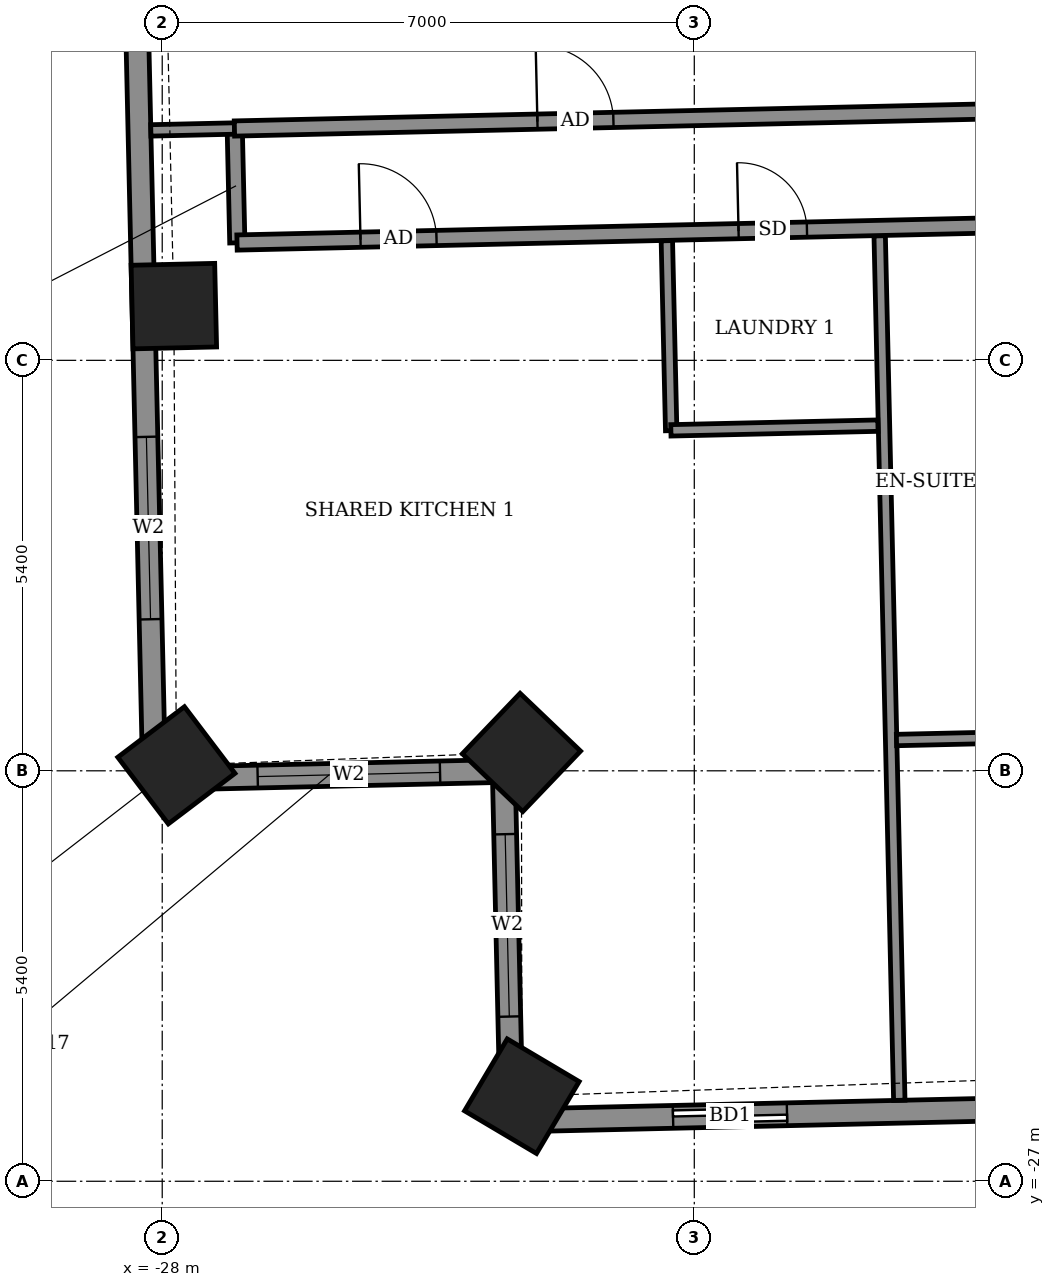
"""IFC4 building model, lengths in metres.
Left out: names, types, materials, properties, quantities, classifications, styles, units other than length and angle.
Written with IfcOpenShell. Run it as: python <this file> out.ifc"""

import sys

from ifc_helpers import new_model, si_unit, direction, frame, frame_2d, origin, origin_2d, place, context, subcontext, project, spatial, rectangle, extrude, element, fill, save


model = new_model("IFC4")
c1 = context("Model", 3, precision=1e-05, world=origin(), true_north=direction((0.0, 1.0)))
c2 = subcontext(c1, "Body", "Model", "MODEL_VIEW")
j1 = project(units=[si_unit("LENGTHUNIT", "METRE"), si_unit("PLANEANGLEUNIT", "RADIAN")], contexts=[c1])
p1 = place(None, origin())
s1 = spatial("IfcSite", under=j1, at=p1, CompositionType="ELEMENT")
p2 = place(p1, origin())
s2 = spatial("IfcBuilding", under=s1, at=p2, CompositionType="ELEMENT")
p3 = place(p2, frame((0.0, 0.0, 231.1)))
s3 = spatial("IfcBuildingStorey", under=s2, at=p3, CompositionType="ELEMENT", Elevation=231.1)
for number, where, z_axis, x_axis in (
    (1, (-27.847, -15.487, -0.55), (0.0, 0.0, 1.0), (0.023, -1.0, 0.0)),
    (2, (-27.814, -21.528, -0.55), (0.0, 0.0, 1.0), (0.604, -0.797, 0.0)),
    (3, (-23.274, -21.358, -0.55), (0.0, 0.0, 1.0), (0.723, -0.691, 0.0)),
    (4, (-23.269, -25.881, -0.55), (0.0, 0.0, 1.0), (0.86, -0.51, 0.0)),
):
    element("IfcColumn", number, at=place(p3, frame(where, z_axis=z_axis, x_axis=x_axis)), inside=s3, PredefinedType="COLUMN", context=c2, shape_type="SweptSolid", body=[
        extrude(rectangle(XDim=1.1, YDim=1.1, at=origin_2d()), origin(), (0.0, 0.0, 1.0), 3.6),
    ])
p4 = place(p3, frame((-28.404, -8.585, 0.0), z_axis=(0.0, 0.0, 1.0), x_axis=(0.022711264838, -0.99974206596, 0.0)))
e5 = element("IfcWall", 5, at=p4, inside=s3, PredefinedType="SOLIDWALL", context=c2, shape_type="SweptSolid", body=[
    extrude(rectangle(XDim=13.125, YDim=0.3, at=frame_2d((6.563, 0.0))), origin(), (0.0, 0.0, 1.0), 2.55),
])
p5 = place(p4, frame((1.975, 0.0, 0.0)))
e6 = element("IfcOpeningElement", 6, at=p5, cuts=e5, PredefinedType="OPENING", context=c2, shape_type="SweptSolid", body=[
    extrude(rectangle(XDim=1.5, YDim=2.4, at=frame_2d((0.75, 1.2))), frame((0.0, 0.16, 0.0), z_axis=(0.0, -1.0, 0.0), x_axis=(1.0, 0.0, 0.0)), (0.0, 0.0, 1.0), 0.32),
])
p6 = place(p4, frame((8.624, 0.0, 0.9)))
e7 = element("IfcOpeningElement", 7, at=p6, cuts=e5, PredefinedType="OPENING", context=c2, shape_type="SweptSolid", body=[
    extrude(rectangle(XDim=2.4, YDim=1.5, at=frame_2d((1.2, 0.75))), frame((0.0, 0.16, 0.0), z_axis=(0.0, -1.0, 0.0), x_axis=(1.0, 0.0, 0.0)), (0.0, 0.0, 1.0), 0.32),
])
p7 = place(p3, frame((-28.106, -21.707, 0.0), z_axis=(0.0, 0.0, 1.0), x_axis=(0.999739556364, 0.022821468877, 0.0)))
e8 = element("IfcWall", 8, at=p7, inside=s3, PredefinedType="SOLIDWALL", context=c2, shape_type="SweptSolid", body=[
    extrude(rectangle(XDim=4.6, YDim=0.3, at=frame_2d((2.3, 0.0))), origin(), (0.0, 0.0, 1.0), 2.55),
])
p8 = place(p7, frame((1.362, 0.0, 0.9)))
e9 = element("IfcOpeningElement", 9, at=p8, cuts=e8, PredefinedType="OPENING", context=c2, shape_type="SweptSolid", body=[
    extrude(rectangle(XDim=2.4, YDim=1.5, at=frame_2d((1.2, 0.75))), frame((0.0, 0.16, 0.0), z_axis=(0.0, -1.0, 0.0), x_axis=(1.0, 0.0, 0.0)), (0.0, 0.0, 1.0), 0.32),
])
p9 = place(p3, frame((-23.507, -21.602, 0.0), z_axis=(0.0, 0.0, 1.0), x_axis=(0.022609285172, -0.999744377441, 0.0)))
e10 = element("IfcWall", 10, at=p9, inside=s3, PredefinedType="SOLIDWALL", context=c2, shape_type="SweptSolid", body=[
    extrude(rectangle(XDim=4.6, YDim=0.3, at=frame_2d((2.3, 0.0))), origin(), (0.0, 0.0, 1.0), 2.55),
])
p10 = place(p9, frame((0.832, 0.0, 0.9)))
e11 = element("IfcOpeningElement", 11, at=p10, cuts=e10, PredefinedType="OPENING", context=c2, shape_type="SweptSolid", body=[
    extrude(rectangle(XDim=2.4, YDim=1.5, at=frame_2d((1.2, 0.75))), frame((0.0, 0.16, 0.0), z_axis=(0.0, -1.0, 0.0), x_axis=(1.0, 0.0, 0.0)), (0.0, 0.0, 1.0), 0.32),
])
p11 = place(p3, frame((-23.403, -26.201, 0.0), z_axis=(0.0, 0.0, 1.0), x_axis=(0.999742770494, 0.022680230258, 0.0)))
e12 = element("IfcWall", 12, at=p11, inside=s3, PredefinedType="SOLIDWALL", context=c2, shape_type="SweptSolid", body=[
    extrude(rectangle(XDim=43.908, YDim=0.3, at=frame_2d((21.954, 0.0))), origin(), (0.0, 0.0, 1.0), 2.55),
])
p12 = place(p11, frame((2.124, 0.0, 0.0)))
e13 = element("IfcOpeningElement", 13, at=p12, cuts=e12, PredefinedType="OPENING", context=c2, shape_type="SweptSolid", body=[
    extrude(rectangle(XDim=1.5, YDim=2.4, at=frame_2d((0.75, 1.2))), frame((0.0, 0.16, 0.0), z_axis=(0.0, -1.0, 0.0), x_axis=(1.0, 0.0, 0.0)), (0.0, 0.0, 1.0), 0.32),
])
p13 = place(p11, frame((8.009, 0.0, 0.0)))
e14 = element("IfcOpeningElement", 14, at=p13, cuts=e12, PredefinedType="OPENING", context=c2, shape_type="SweptSolid", body=[
    extrude(rectangle(XDim=1.2, YDim=2.4, at=frame_2d((0.6, 1.2))), frame((0.0, 0.16, 0.0), z_axis=(0.0, -1.0, 0.0), x_axis=(1.0, 0.0, 0.0)), (0.0, 0.0, 1.0), 0.32),
])
p14 = place(p11, frame((11.225, 0.0, 0.0)))
e15 = element("IfcOpeningElement", 15, at=p14, cuts=e12, PredefinedType="OPENING", context=c2, shape_type="SweptSolid", body=[
    extrude(rectangle(XDim=1.5, YDim=2.4, at=frame_2d((0.75, 1.2))), frame((0.0, 0.16, 0.0), z_axis=(0.0, -1.0, 0.0), x_axis=(1.0, 0.0, 0.0)), (0.0, 0.0, 1.0), 0.32),
])
p15 = place(p11, frame((16.093, 0.0, 0.0)))
e16 = element("IfcOpeningElement", 16, at=p15, cuts=e12, PredefinedType="OPENING", context=c2, shape_type="SweptSolid", body=[
    extrude(rectangle(XDim=1.5, YDim=2.4, at=frame_2d((0.75, 1.2))), frame((0.0, 0.16, 0.0), z_axis=(0.0, -1.0, 0.0), x_axis=(1.0, 0.0, 0.0)), (0.0, 0.0, 1.0), 0.32),
])
p16 = place(p11, frame((19.477, 0.0, 0.0)))
e17 = element("IfcOpeningElement", 17, at=p16, cuts=e12, PredefinedType="OPENING", context=c2, shape_type="SweptSolid", body=[
    extrude(rectangle(XDim=1.5, YDim=2.4, at=frame_2d((0.75, 1.2))), frame((0.0, 0.16, 0.0), z_axis=(0.0, -1.0, 0.0), x_axis=(1.0, 0.0, 0.0)), (0.0, 0.0, 1.0), 0.32),
])
p17 = place(p11, frame((24.8, 0.0, 0.0)))
e18 = element("IfcOpeningElement", 18, at=p17, cuts=e12, PredefinedType="OPENING", context=c2, shape_type="SweptSolid", body=[
    extrude(rectangle(XDim=1.5, YDim=2.4, at=frame_2d((0.75, 1.2))), frame((0.0, 0.16, 0.0), z_axis=(0.0, -1.0, 0.0), x_axis=(1.0, 0.0, 0.0)), (0.0, 0.0, 1.0), 0.32),
])
p18 = place(p11, frame((30.111, 0.0, 0.0)))
e19 = element("IfcOpeningElement", 19, at=p18, cuts=e12, PredefinedType="OPENING", context=c2, shape_type="SweptSolid", body=[
    extrude(rectangle(XDim=1.5, YDim=2.4, at=frame_2d((0.75, 1.2))), frame((0.0, 0.16, 0.0), z_axis=(0.0, -1.0, 0.0), x_axis=(1.0, 0.0, 0.0)), (0.0, 0.0, 1.0), 0.32),
])
p19 = place(p11, frame((33.495, 0.0, 0.0)))
e20 = element("IfcOpeningElement", 20, at=p19, cuts=e12, PredefinedType="OPENING", context=c2, shape_type="SweptSolid", body=[
    extrude(rectangle(XDim=1.5, YDim=2.4, at=frame_2d((0.75, 1.2))), frame((0.0, 0.16, 0.0), z_axis=(0.0, -1.0, 0.0), x_axis=(1.0, 0.0, 0.0)), (0.0, 0.0, 1.0), 0.32),
])
p20 = place(p11, frame((38.245, 0.0, 0.0)))
e21 = element("IfcOpeningElement", 21, at=p20, cuts=e12, PredefinedType="OPENING", context=c2, shape_type="SweptSolid", body=[
    extrude(rectangle(XDim=1.5, YDim=2.4, at=frame_2d((0.75, 1.2))), frame((0.0, 0.16, 0.0), z_axis=(0.0, -1.0, 0.0), x_axis=(1.0, 0.0, 0.0)), (0.0, 0.0, 1.0), 0.32),
])
p21 = place(p11, frame((41.482, 0.0, 0.9)))
e22 = element("IfcOpeningElement", 22, at=p21, cuts=e12, PredefinedType="OPENING", context=c2, shape_type="SweptSolid", body=[
    extrude(rectangle(XDim=1.2, YDim=1.5, at=frame_2d((0.6, 0.75))), frame((0.0, 0.16, 0.0), z_axis=(0.0, -1.0, 0.0), x_axis=(1.0, 0.0, 0.0)), (0.0, 0.0, 1.0), 0.32),
])
p22 = place(p3, frame((-18.303, -25.935, 0.0), z_axis=(0.0, 0.0, 1.0), x_axis=(-0.022684355347, 0.999742676904, 0.0)))
e23 = element("IfcWall", 23, at=p22, inside=s3, PredefinedType="PARTITIONING", context=c2, shape_type="SweptSolid", body=[
    extrude(rectangle(XDim=11.376, YDim=0.15, at=frame_2d((5.688, 0.0))), origin(), (0.0, 0.0, 1.0), 2.55),
])
p23 = place(p3, frame((-18.34, -21.195, 0.0), z_axis=(0.0, 0.0, 1.0), x_axis=(0.99974053329, 0.022778632478, 0.0)))
e24 = element("IfcWall", 24, at=p23, inside=s3, PredefinedType="PARTITIONING", context=c2, shape_type="SweptSolid", body=[
    extrude(rectangle(XDim=2.326, YDim=0.15, at=frame_2d((1.163, 0.0))), origin(), (0.0, 0.0, 1.0), 3.05),
])
p24 = place(p3, frame((-21.304, -17.125, 0.0), z_axis=(0.0, 0.0, 1.0), x_axis=(-0.022854521249, 0.999738801317, 0.0)))
e25 = element("IfcWall", 25, at=p24, inside=s3, PredefinedType="PARTITIONING", context=c2, shape_type="SweptSolid", body=[
    extrude(rectangle(XDim=2.5, YDim=0.15, at=frame_2d((1.25, 0.0))), origin(), (0.0, 0.0, 1.0), 3.05),
])
p25 = place(p3, frame((-21.308, -17.121, 0.0), z_axis=(0.0, 0.0, 1.0), x_axis=(0.999741002259, 0.022758040381, 0.0)))
e26 = element("IfcWall", 26, at=p25, inside=s3, PredefinedType="PARTITIONING", context=c2, shape_type="SweptSolid", body=[
    extrude(rectangle(XDim=2.725, YDim=0.15, at=frame_2d((1.362, 0.0))), origin(), (0.0, 0.0, 1.0), 3.05),
])
p26 = place(p3, frame((-27.012, -14.654, 0.0), z_axis=(0.0, 0.0, 1.0), x_axis=(-0.022617910375, 0.999744182344, 0.0)))
e27 = element("IfcWall", 27, at=p26, inside=s3, PredefinedType="PARTITIONING", context=c2, shape_type="SweptSolid", body=[
    extrude(rectangle(XDim=1.5, YDim=0.2, at=frame_2d((0.75, 0.0))), origin(), (0.0, 0.0, 1.0), 3.05),
])
p27 = place(p3, frame((-27.016, -14.65, 0.0), z_axis=(0.0, 0.0, 1.0), x_axis=(0.999742623033, 0.022686729391, 0.0)))
e28 = element("IfcWall", 28, at=p27, inside=s3, PredefinedType="PARTITIONING", context=c2, shape_type="SweptSolid", body=[
    extrude(rectangle(XDim=50.858, YDim=0.2, at=frame_2d((25.429, 0.0))), origin(), (0.0, 0.0, 1.0), 3.05),
])
p28 = place(p27, frame((1.625, 0.0, 0.0)))
e29 = element("IfcOpeningElement", 29, at=p28, cuts=e28, PredefinedType="OPENING", context=c2, shape_type="SweptSolid", body=[
    extrude(rectangle(XDim=1.0, YDim=2.1, at=frame_2d((0.5, 1.05))), frame((0.0, 0.11, 0.0), z_axis=(0.0, -1.0, 0.0), x_axis=(1.0, 0.0, 0.0)), (0.0, 0.0, 1.0), 0.22),
])
p29 = place(p27, frame((6.6, 0.0, 0.0)))
e30 = element("IfcOpeningElement", 30, at=p29, cuts=e28, PredefinedType="OPENING", context=c2, shape_type="SweptSolid", body=[
    extrude(rectangle(XDim=0.9, YDim=2.1, at=frame_2d((0.45, 1.05))), frame((0.0, 0.11, 0.0), z_axis=(0.0, -1.0, 0.0), x_axis=(1.0, 0.0, 0.0)), (0.0, 0.0, 1.0), 0.22),
])
p30 = place(p27, frame((11.5, 0.0, 0.0)))
e31 = element("IfcOpeningElement", 31, at=p30, cuts=e28, PredefinedType="OPENING", context=c2, shape_type="SweptSolid", body=[
    extrude(rectangle(XDim=0.9, YDim=2.1, at=frame_2d((0.45, 1.05))), frame((0.0, 0.11, 0.0), z_axis=(0.0, -1.0, 0.0), x_axis=(1.0, 0.0, 0.0)), (0.0, 0.0, 1.0), 0.22),
])
p31 = place(p27, frame((13.675, 0.0, 0.0)))
e32 = element("IfcOpeningElement", 32, at=p31, cuts=e28, PredefinedType="OPENING", context=c2, shape_type="SweptSolid", body=[
    extrude(rectangle(XDim=0.9, YDim=2.1, at=frame_2d((0.45, 1.05))), frame((0.0, 0.11, 0.0), z_axis=(0.0, -1.0, 0.0), x_axis=(1.0, 0.0, 0.0)), (0.0, 0.0, 1.0), 0.22),
])
p32 = place(p27, frame((20.625, 0.0, 0.0)))
e33 = element("IfcOpeningElement", 33, at=p32, cuts=e28, PredefinedType="OPENING", context=c2, shape_type="SweptSolid", body=[
    extrude(rectangle(XDim=0.9, YDim=2.1, at=frame_2d((0.45, 1.05))), frame((0.0, 0.11, 0.0), z_axis=(0.0, -1.0, 0.0), x_axis=(1.0, 0.0, 0.0)), (0.0, 0.0, 1.0), 0.22),
])
p33 = place(p27, frame((22.775, 0.0, 0.0)))
e34 = element("IfcOpeningElement", 34, at=p33, cuts=e28, PredefinedType="OPENING", context=c2, shape_type="SweptSolid", body=[
    extrude(rectangle(XDim=0.9, YDim=2.1, at=frame_2d((0.45, 1.05))), frame((0.0, 0.11, 0.0), z_axis=(0.0, -1.0, 0.0), x_axis=(1.0, 0.0, 0.0)), (0.0, 0.0, 1.0), 0.22),
])
p34 = place(p27, frame((29.65, 0.0, 0.0)))
e35 = element("IfcOpeningElement", 35, at=p34, cuts=e28, PredefinedType="OPENING", context=c2, shape_type="SweptSolid", body=[
    extrude(rectangle(XDim=0.9, YDim=2.1, at=frame_2d((0.45, 1.05))), frame((0.0, 0.11, 0.0), z_axis=(0.0, -1.0, 0.0), x_axis=(1.0, 0.0, 0.0)), (0.0, 0.0, 1.0), 0.22),
])
p35 = place(p27, frame((31.625, 0.0, 0.0)))
e36 = element("IfcOpeningElement", 36, at=p35, cuts=e28, PredefinedType="OPENING", context=c2, shape_type="SweptSolid", body=[
    extrude(rectangle(XDim=0.9, YDim=2.1, at=frame_2d((0.45, 1.05))), frame((0.0, 0.11, 0.0), z_axis=(0.0, -1.0, 0.0), x_axis=(1.0, 0.0, 0.0)), (0.0, 0.0, 1.0), 0.22),
])
p36 = place(p27, frame((38.5, 0.0, 0.0)))
e37 = element("IfcOpeningElement", 37, at=p36, cuts=e28, PredefinedType="OPENING", context=c2, shape_type="SweptSolid", body=[
    extrude(rectangle(XDim=0.9, YDim=2.1, at=frame_2d((0.45, 1.05))), frame((0.0, 0.11, 0.0), z_axis=(0.0, -1.0, 0.0), x_axis=(1.0, 0.0, 0.0)), (0.0, 0.0, 1.0), 0.22),
])
p37 = place(p27, frame((40.55, 0.0, 0.0)))
e38 = element("IfcOpeningElement", 38, at=p37, cuts=e28, PredefinedType="OPENING", context=c2, shape_type="SweptSolid", body=[
    extrude(rectangle(XDim=0.9, YDim=2.1, at=frame_2d((0.45, 1.05))), frame((0.0, 0.11, 0.0), z_axis=(0.0, -1.0, 0.0), x_axis=(1.0, 0.0, 0.0)), (0.0, 0.0, 1.0), 0.22),
])
p38 = place(p27, frame((47.601, 0.0, 0.0)))
e39 = element("IfcOpeningElement", 39, at=p38, cuts=e28, PredefinedType="OPENING", context=c2, shape_type="SweptSolid", body=[
    extrude(rectangle(XDim=1.0, YDim=2.1, at=frame_2d((0.5, 1.05))), frame((0.0, 0.11, 0.0), z_axis=(0.0, -1.0, 0.0), x_axis=(1.0, 0.0, 0.0)), (0.0, 0.0, 1.0), 0.22),
])
p39 = place(p3, frame((-16.678, -12.919, 0.0), z_axis=(0.0, 0.0, 1.0), x_axis=(-0.022696191528, 0.999742408268, 0.0)))
e40 = element("IfcWall", 40, at=p39, inside=s3, PredefinedType="PARTITIONING", context=c2, shape_type="SweptSolid", body=[
    extrude(rectangle(XDim=25.074, YDim=0.2, at=frame_2d((12.537, 0.0))), origin(), (0.0, 0.0, 1.0), 3.05),
])
p40 = place(p39, frame((21.237, 0.0, 0.0)))
e41 = element("IfcOpeningElement", 41, at=p40, cuts=e40, PredefinedType="OPENING", context=c2, shape_type="SweptSolid", body=[
    extrude(rectangle(XDim=1.0, YDim=2.1, at=frame_2d((0.5, 1.05))), frame((0.0, 0.11, 0.0), z_axis=(0.0, -1.0, 0.0), x_axis=(1.0, 0.0, 0.0)), (0.0, 0.0, 1.0), 0.22),
])
p41 = place(p39, frame((23.424, 0.0, 0.0)))
e42 = element("IfcOpeningElement", 42, at=p41, cuts=e40, PredefinedType="OPENING", context=c2, shape_type="SweptSolid", body=[
    extrude(rectangle(XDim=0.9, YDim=2.1, at=frame_2d((0.45, 1.05))), frame((0.0, 0.11, 0.0), z_axis=(0.0, -1.0, 0.0), x_axis=(1.0, 0.0, 0.0)), (0.0, 0.0, 1.0), 0.22),
])
p42 = place(p39, frame((18.799, 0.0, 0.0)))
e43 = element("IfcOpeningElement", 43, at=p42, cuts=e40, PredefinedType="OPENING", context=c2, shape_type="SweptSolid", body=[
    extrude(rectangle(XDim=1.0, YDim=2.1, at=frame_2d((0.5, 1.05))), frame((0.0, 0.11, 0.0), z_axis=(0.0, -1.0, 0.0), x_axis=(1.0, 0.0, 0.0)), (0.0, 0.0, 1.0), 0.22),
])
p43 = place(p39, frame((15.759, 0.0, 0.0)))
e44 = element("IfcOpeningElement", 44, at=p43, cuts=e40, PredefinedType="OPENING", context=c2, shape_type="SweptSolid", body=[
    extrude(rectangle(XDim=1.0, YDim=2.1, at=frame_2d((0.5, 1.05))), frame((0.0, 0.11, 0.0), z_axis=(0.0, -1.0, 0.0), x_axis=(1.0, 0.0, 0.0)), (0.0, 0.0, 1.0), 0.22),
])
p44 = place(p39, frame((12.76, 0.0, 0.0)))
e45 = element("IfcOpeningElement", 45, at=p44, cuts=e40, PredefinedType="OPENING", context=c2, shape_type="SweptSolid", body=[
    extrude(rectangle(XDim=1.0, YDim=2.1, at=frame_2d((0.5, 1.05))), frame((0.0, 0.11, 0.0), z_axis=(0.0, -1.0, 0.0), x_axis=(1.0, 0.0, 0.0)), (0.0, 0.0, 1.0), 0.22),
])
p45 = place(p39, frame((9.752, 0.0, 0.0)))
e46 = element("IfcOpeningElement", 46, at=p45, cuts=e40, PredefinedType="OPENING", context=c2, shape_type="SweptSolid", body=[
    extrude(rectangle(XDim=1.0, YDim=2.1, at=frame_2d((0.5, 1.05))), frame((0.0, 0.11, 0.0), z_axis=(0.0, -1.0, 0.0), x_axis=(1.0, 0.0, 0.0)), (0.0, 0.0, 1.0), 0.22),
])
p46 = place(p39, frame((7.199, 0.0, 0.0)))
e47 = element("IfcOpeningElement", 47, at=p46, cuts=e40, PredefinedType="OPENING", context=c2, shape_type="SweptSolid", body=[
    extrude(rectangle(XDim=1.0, YDim=2.1, at=frame_2d((0.5, 1.05))), frame((0.0, 0.11, 0.0), z_axis=(0.0, -1.0, 0.0), x_axis=(1.0, 0.0, 0.0)), (0.0, 0.0, 1.0), 0.22),
])
p47 = place(p39, frame((4.899, 0.0, 0.0)))
e48 = element("IfcOpeningElement", 48, at=p47, cuts=e40, PredefinedType="OPENING", context=c2, shape_type="SweptSolid", body=[
    extrude(rectangle(XDim=0.9, YDim=2.1, at=frame_2d((0.45, 1.05))), frame((0.0, 0.11, 0.0), z_axis=(0.0, -1.0, 0.0), x_axis=(1.0, 0.0, 0.0)), (0.0, 0.0, 1.0), 0.22),
])
p48 = place(p3, frame((-28.15, -13.175, 0.0), z_axis=(0.0, 0.0, 1.0), x_axis=(0.999740692912, 0.02277162569, 0.0)))
e49 = element("IfcWall", 49, at=p48, inside=s3, PredefinedType="PARTITIONING", context=c2, shape_type="SweptSolid", body=[
    extrude(rectangle(XDim=1.104, YDim=0.15, at=frame_2d((0.552, 0.0))), origin(), (0.0, 0.0, 1.0), 2.55),
])
p49 = place(p3, frame((-27.05, -13.15, 0.0), z_axis=(0.0, 0.0, 1.0), x_axis=(0.999743679035, 0.022640146404, 0.0)))
e50 = element("IfcWall", 50, at=p49, inside=s3, PredefinedType="PARTITIONING", context=c2, shape_type="SweptSolid", body=[
    extrude(rectangle(XDim=10.374, YDim=0.2, at=frame_2d((5.187, 0.0))), origin(), (0.0, 0.0, 1.0), 3.05),
])
p50 = place(p49, frame((3.987, 0.0, 0.0)))
e51 = element("IfcOpeningElement", 51, at=p50, cuts=e50, PredefinedType="OPENING", context=c2, shape_type="SweptSolid", body=[
    extrude(rectangle(XDim=1.0, YDim=2.1, at=frame_2d((0.5, 1.05))), frame((0.0, 0.11, 0.0), z_axis=(0.0, -1.0, 0.0), x_axis=(1.0, 0.0, 0.0)), (0.0, 0.0, 1.0), 0.22),
])
p51 = place(p6, origin())
e52 = element("IfcWindow", 52, at=p51, inside=s3, PartitioningType="DOUBLE_PANEL_VERTICAL", PredefinedType="WINDOW", context=c2, shape_type="SweptSolid", body=[
    extrude(rectangle(XDim=2.4, YDim=1.5, at=frame_2d((1.2, 0.75))), frame((0.0, 0.03, 0.0), z_axis=(0.0, -1.0, 0.0), x_axis=(1.0, 0.0, 0.0)), (0.0, 0.0, 1.0), 0.06),
])
fill(e7, e52)
p52 = place(p8, origin())
e53 = element("IfcWindow", 53, at=p52, inside=s3, PartitioningType="DOUBLE_PANEL_VERTICAL", PredefinedType="WINDOW", context=c2, shape_type="SweptSolid", body=[
    extrude(rectangle(XDim=2.4, YDim=1.5, at=frame_2d((1.2, 0.75))), frame((0.0, 0.03, 0.0), z_axis=(0.0, -1.0, 0.0), x_axis=(1.0, 0.0, 0.0)), (0.0, 0.0, 1.0), 0.06),
])
fill(e9, e53)
p53 = place(p10, origin())
e54 = element("IfcWindow", 54, at=p53, inside=s3, PartitioningType="DOUBLE_PANEL_VERTICAL", PredefinedType="WINDOW", context=c2, shape_type="SweptSolid", body=[
    extrude(rectangle(XDim=2.4, YDim=1.5, at=frame_2d((1.2, 0.75))), frame((0.0, 0.03, 0.0), z_axis=(0.0, -1.0, 0.0), x_axis=(1.0, 0.0, 0.0)), (0.0, 0.0, 1.0), 0.06),
])
fill(e11, e54)
p54 = place(p12, origin())
e55 = element("IfcDoor", 55, at=p54, inside=s3, OperationType="SLIDING_TO_LEFT", PredefinedType="DOOR", context=c2, shape_type="SweptSolid", body=[
    extrude(rectangle(XDim=1.5, YDim=2.4, at=frame_2d((0.75, 1.2))), frame((0.0, 0.025, 0.0), z_axis=(0.0, -1.0, 0.0), x_axis=(1.0, 0.0, 0.0)), (0.0, 0.0, 1.0), 0.05),
])
fill(e13, e55)
p55 = place(p28, origin())
e56 = element("IfcDoor", 56, at=p55, inside=s3, OperationType="SINGLE_SWING_LEFT", PredefinedType="DOOR", context=c2, shape_type="SweptSolid", body=[
    extrude(rectangle(XDim=1.0, YDim=2.1, at=frame_2d((0.5, 1.05))), frame((0.0, 0.025, 0.0), z_axis=(0.0, -1.0, 0.0), x_axis=(1.0, 0.0, 0.0)), (0.0, 0.0, 1.0), 0.05),
])
fill(e29, e56)
p56 = place(p29, origin())
e57 = element("IfcDoor", 57, at=p56, inside=s3, OperationType="SINGLE_SWING_LEFT", PredefinedType="DOOR", context=c2, shape_type="SweptSolid", body=[
    extrude(rectangle(XDim=0.9, YDim=2.1, at=frame_2d((0.45, 1.05))), frame((0.0, 0.025, 0.0), z_axis=(0.0, -1.0, 0.0), x_axis=(1.0, 0.0, 0.0)), (0.0, 0.0, 1.0), 0.05),
])
fill(e30, e57)
p57 = place(p50, origin())
e58 = element("IfcDoor", 58, at=p57, inside=s3, OperationType="SINGLE_SWING_LEFT", PredefinedType="DOOR", context=c2, shape_type="SweptSolid", body=[
    extrude(rectangle(XDim=1.0, YDim=2.1, at=frame_2d((0.5, 1.05))), frame((0.0, 0.025, 0.0), z_axis=(0.0, -1.0, 0.0), x_axis=(1.0, 0.0, 0.0)), (0.0, 0.0, 1.0), 0.05),
])
fill(e51, e58)
save(model, sys.argv[1])
